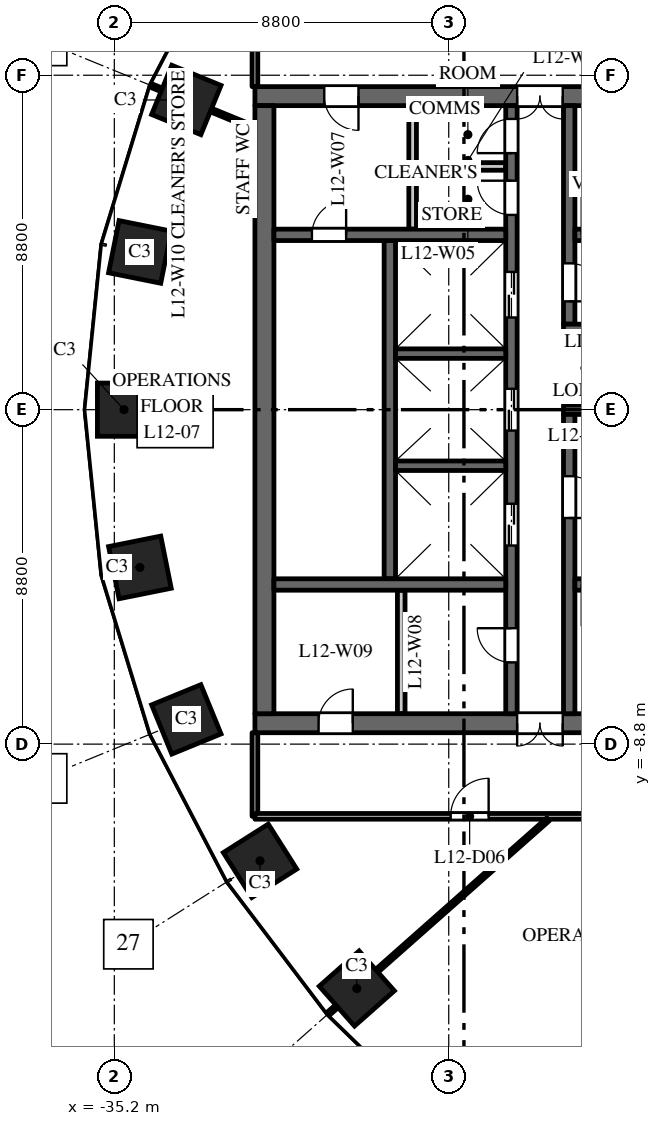
"""IFC4 building model, lengths in metres.
Left out: names, types, materials, properties, quantities, classifications, styles, units other than length and angle.
Written with IfcOpenShell. Run it as: python <this file> out.ifc"""

import sys

from ifc_helpers import new_model, si_unit, direction, frame, frame_2d, origin, origin_2d, place, context, subcontext, project, spatial, rectangle, extrude, element, fill, save


model = new_model("IFC4")
c1 = context("Model", 3, precision=1e-05, world=origin(), true_north=direction((0.0, 1.0)))
c2 = subcontext(c1, "Body", "Model", "MODEL_VIEW")
j1 = project(units=[si_unit("LENGTHUNIT", "METRE"), si_unit("PLANEANGLEUNIT", "RADIAN")], contexts=[c1])
p1 = place(None, origin())
s1 = spatial("IfcSite", under=j1, at=p1, CompositionType="ELEMENT")
p2 = place(p1, origin())
s2 = spatial("IfcBuilding", under=s1, at=p2, CompositionType="ELEMENT")
p3 = place(p2, frame((0.0, 0.0, 58.5)))
s3 = spatial("IfcBuildingStorey", under=s2, at=p3, CompositionType="ELEMENT", Elevation=58.5)
for number, where, z_axis, x_axis in (
    (1, (-33.305, 8.149, 0.0), (0.0, 0.0, 1.0), (-0.379, -0.925, 0.0)),
    (2, (-34.527, 4.151, 0.0), (0.0, 0.0, 1.0), (-0.197, -0.98, 0.0)),
    (3, (-34.945, 0.0, 0.0), (0.0, 0.0, 1.0), (0.0, -1.0, 0.0)),
    (4, (-34.527, -4.151, 0.0), (0.0, 0.0, 1.0), (0.197, -0.98, 0.0)),
    (5, (-33.305, -8.149, 0.0), (0.0, 0.0, 1.0), (0.379, -0.925, 0.0)),
    (6, (-31.365, -11.871, 0.0), (0.0, 0.0, 1.0), (0.535, -0.845, 0.0)),
    (7, (-28.819, -15.23, 0.0), (0.0, 0.0, 1.0), (0.663, -0.749, 0.0)),
):
    element("IfcColumn", number, at=place(p3, frame(where, z_axis=z_axis, x_axis=x_axis)), inside=s3, PredefinedType="COLUMN", context=c2, shape_type="SweptSolid", body=[
        extrude(rectangle(XDim=1.4, YDim=1.4, at=origin_2d()), origin(), (0.0, 0.0, 1.0), 4.0),
    ])
p4 = place(p3, frame((-16.5, 8.25, 0.0), z_axis=(0.0, 0.0, 1.0), x_axis=(-1.0, 0.0, 0.0)))
e8 = element("IfcWall", 8, at=p4, inside=s3, PredefinedType="SHEAR", context=c2, shape_type="SweptSolid", body=[
    extrude(rectangle(XDim=15.0, YDim=0.5, at=frame_2d((7.5, 0.0))), origin(), (0.0, 0.0, 1.0), 3.7),
])
p5 = place(p4, frame((6.9, 0.0, 0.0)))
e9 = element("IfcOpeningElement", 9, at=p5, cuts=e8, PredefinedType="OPENING", context=c2, shape_type="SweptSolid", body=[
    extrude(rectangle(XDim=1.2, YDim=2.1, at=frame_2d((0.6, 1.05))), frame((0.0, 0.26, 0.0), z_axis=(0.0, -1.0, 0.0), x_axis=(1.0, 0.0, 0.0)), (0.0, 0.0, 1.0), 0.52),
])
p6 = place(p4, frame((12.275, 0.0, 0.0)))
e10 = element("IfcOpeningElement", 10, at=p6, cuts=e8, PredefinedType="OPENING", context=c2, shape_type="SweptSolid", body=[
    extrude(rectangle(XDim=0.9, YDim=2.1, at=frame_2d((0.45, 1.05))), frame((0.0, 0.26, 0.0), z_axis=(0.0, -1.0, 0.0), x_axis=(1.0, 0.0, 0.0)), (0.0, 0.0, 1.0), 0.52),
])
p7 = place(p3, frame((-16.5, -8.25, 0.0), z_axis=(0.0, 0.0, 1.0), x_axis=(-1.0, 0.0, 0.0)))
e11 = element("IfcWall", 11, at=p7, inside=s3, PredefinedType="SHEAR", context=c2, shape_type="SweptSolid", body=[
    extrude(rectangle(XDim=15.0, YDim=0.5, at=frame_2d((7.5, 0.0))), origin(), (0.0, 0.0, 1.0), 3.7),
])
p8 = place(p7, frame((6.9, 0.0, 0.0)))
e12 = element("IfcOpeningElement", 12, at=p8, cuts=e11, PredefinedType="OPENING", context=c2, shape_type="SweptSolid", body=[
    extrude(rectangle(XDim=1.2, YDim=2.1, at=frame_2d((0.6, 1.05))), frame((0.0, 0.26, 0.0), z_axis=(0.0, -1.0, 0.0), x_axis=(1.0, 0.0, 0.0)), (0.0, 0.0, 1.0), 0.52),
])
p9 = place(p7, frame((12.425, 0.0, 0.0)))
e13 = element("IfcOpeningElement", 13, at=p9, cuts=e11, PredefinedType="OPENING", context=c2, shape_type="SweptSolid", body=[
    extrude(rectangle(XDim=0.9, YDim=2.1, at=frame_2d((0.45, 1.05))), frame((0.0, 0.26, 0.0), z_axis=(0.0, -1.0, 0.0), x_axis=(1.0, 0.0, 0.0)), (0.0, 0.0, 1.0), 0.52),
])
p10 = place(p3, frame((-27.95, -4.45, 0.0), z_axis=(0.0, 0.0, 1.0), x_axis=(0.0, 1.0, 0.0)))
e14 = element("IfcWall", 14, at=p10, inside=s3, PredefinedType="SHEAR", context=c2, shape_type="SweptSolid", body=[
    extrude(rectangle(XDim=8.9, YDim=0.3, at=frame_2d((4.45, 0.0))), origin(), (0.0, 0.0, 1.0), 3.7),
])
p11 = place(p3, frame((-24.75, -8.0, 0.0), z_axis=(0.0, 0.0, 1.0), x_axis=(0.0, 1.0, 0.0)))
e15 = element("IfcWall", 15, at=p11, inside=s3, PredefinedType="SHEAR", context=c2, shape_type="SweptSolid", body=[
    extrude(rectangle(XDim=16.0, YDim=0.3, at=frame_2d((8.0, 0.0))), origin(), (0.0, 0.0, 1.0), 3.7),
])
p12 = place(p11, frame((4.425, 0.0, 0.0)))
e16 = element("IfcOpeningElement", 16, at=p12, cuts=e15, PredefinedType="OPENING", context=c2, shape_type="SweptSolid", body=[
    extrude(rectangle(XDim=1.1, YDim=2.1, at=frame_2d((0.55, 1.05))), frame((0.0, 0.16, 0.0), z_axis=(0.0, -1.0, 0.0), x_axis=(1.0, 0.0, 0.0)), (0.0, 0.0, 1.0), 0.32),
])
p13 = place(p11, frame((7.45, 0.0, 0.0)))
e17 = element("IfcOpeningElement", 17, at=p13, cuts=e15, PredefinedType="OPENING", context=c2, shape_type="SweptSolid", body=[
    extrude(rectangle(XDim=1.1, YDim=2.1, at=frame_2d((0.55, 1.05))), frame((0.0, 0.16, 0.0), z_axis=(0.0, -1.0, 0.0), x_axis=(1.0, 0.0, 0.0)), (0.0, 0.0, 1.0), 0.32),
])
p14 = place(p11, frame((10.425, 0.0, 0.0)))
e18 = element("IfcOpeningElement", 18, at=p14, cuts=e15, PredefinedType="OPENING", context=c2, shape_type="SweptSolid", body=[
    extrude(rectangle(XDim=1.2, YDim=2.1, at=frame_2d((0.6, 1.05))), frame((0.0, 0.16, 0.0), z_axis=(0.0, -1.0, 0.0), x_axis=(1.0, 0.0, 0.0)), (0.0, 0.0, 1.0), 0.32),
])
p15 = place(p11, frame((13.125, 0.0, 0.0)))
e19 = element("IfcOpeningElement", 19, at=p15, cuts=e15, PredefinedType="OPENING", context=c2, shape_type="SweptSolid", body=[
    extrude(rectangle(XDim=0.9, YDim=2.1, at=frame_2d((0.45, 1.05))), frame((0.0, 0.16, 0.0), z_axis=(0.0, -1.0, 0.0), x_axis=(1.0, 0.0, 0.0)), (0.0, 0.0, 1.0), 0.32),
])
p16 = place(p11, frame((14.75, 0.0, 0.0)))
e20 = element("IfcOpeningElement", 20, at=p16, cuts=e15, PredefinedType="OPENING", context=c2, shape_type="SweptSolid", body=[
    extrude(rectangle(XDim=0.9, YDim=2.1, at=frame_2d((0.45, 1.05))), frame((0.0, 0.16, 0.0), z_axis=(0.0, -1.0, 0.0), x_axis=(1.0, 0.0, 0.0)), (0.0, 0.0, 1.0), 0.32),
])
p17 = place(p11, frame((1.35, 0.0, 0.0)))
e21 = element("IfcOpeningElement", 21, at=p17, cuts=e15, PredefinedType="OPENING", context=c2, shape_type="SweptSolid", body=[
    extrude(rectangle(XDim=0.9, YDim=2.1, at=frame_2d((0.45, 1.05))), frame((0.0, 0.16, 0.0), z_axis=(0.0, -1.0, 0.0), x_axis=(1.0, 0.0, 0.0)), (0.0, 0.0, 1.0), 0.32),
])
p18 = place(p3, frame((-20.1, 0.0, 0.0), z_axis=(0.0, 0.0, 1.0), x_axis=(-1.0, 0.0, 0.0)))
e22 = element("IfcWall", 22, at=p18, inside=s3, PredefinedType="SHEAR", context=c2, shape_type="SweptSolid", body=[
    extrude(rectangle(XDim=3.28, YDim=0.25, at=frame_2d((1.64, 0.0))), origin(), (0.0, 0.0, 1.0), 3.7),
])
p19 = place(p3, frame((-31.25, -8.0, 0.0), z_axis=(0.0, 0.0, 1.0), x_axis=(0.0, 1.0, 0.0)))
e23 = element("IfcWall", 23, at=p19, inside=s3, PredefinedType="SHEAR", context=c2, shape_type="SweptSolid", body=[
    extrude(rectangle(XDim=16.0, YDim=0.5, at=frame_2d((8.0, 0.0))), origin(), (0.0, 0.0, 1.0), 3.7),
])
p20 = place(p3, frame((-24.9, 4.6, 0.0), z_axis=(0.0, 0.0, 1.0), x_axis=(-1.0, 0.0, 0.0)))
e24 = element("IfcWall", 24, at=p20, inside=s3, PredefinedType="SHEAR", context=c2, shape_type="SweptSolid", body=[
    extrude(rectangle(XDim=6.1, YDim=0.3, at=frame_2d((3.05, 0.0))), origin(), (0.0, 0.0, 1.0), 3.7),
])
p21 = place(p20, frame((4.2, 0.0, 0.0)))
e25 = element("IfcOpeningElement", 25, at=p21, cuts=e24, PredefinedType="OPENING", context=c2, shape_type="SweptSolid", body=[
    extrude(rectangle(XDim=0.9, YDim=2.1, at=frame_2d((0.45, 1.05))), frame((0.0, 0.16, 0.0), z_axis=(0.0, -1.0, 0.0), x_axis=(1.0, 0.0, 0.0)), (0.0, 0.0, 1.0), 0.32),
])
for number, where, z_axis, x_axis in (
    (26, (-27.35, 4.75, 0.0), (0.0, 0.0, 1.0), (0.0, 1.0, 0.0)),
    (27, (-27.65, -8.0, 0.0), (0.0, 0.0, 1.0), (0.0, 1.0, 0.0)),
):
    element("IfcWall", number, at=place(p3, frame(where, z_axis=z_axis, x_axis=x_axis)), inside=s3, PredefinedType="PARTITIONING", context=c2, shape_type="SweptSolid", body=[
        extrude(rectangle(XDim=3.25, YDim=0.2, at=frame_2d((1.625, 0.0))), origin(), (0.0, 0.0, 1.0), 3.7),
    ])
p22 = place(p3, frame((-24.9, 6.4, 0.0), z_axis=(0.0, 0.0, 1.0), x_axis=(-1.0, 0.0, 0.0)))
e28 = element("IfcWall", 28, at=p22, inside=s3, PredefinedType="PARTITIONING", context=c2, shape_type="SweptSolid", body=[
    extrude(rectangle(XDim=2.35, YDim=0.2, at=frame_2d((1.175, 0.0))), origin(), (0.0, 0.0, 1.0), 3.7),
])
p23 = place(p3, frame((-24.9, -4.6, 0.0), z_axis=(0.0, 0.0, 1.0), x_axis=(-1.0, 0.0, 0.0)))
e29 = element("IfcWall", 29, at=p23, inside=s3, PredefinedType="SHEAR", context=c2, shape_type="SweptSolid", body=[
    extrude(rectangle(XDim=6.1, YDim=0.3, at=frame_2d((3.05, 0.0))), origin(), (0.0, 0.0, 1.0), 3.7),
])
for number, where, z_axis, x_axis in (
    (30, (-24.9, -1.475, 0.0), (0.0, 0.0, 1.0), (-1.0, 0.0, 0.0)),
    (31, (-24.9, 1.475, 0.0), (0.0, 0.0, 1.0), (-1.0, 0.0, 0.0)),
):
    element("IfcWall", number, at=place(p3, frame(where, z_axis=z_axis, x_axis=x_axis)), inside=s3, PredefinedType="SHEAR", context=c2, shape_type="SweptSolid", body=[
        extrude(rectangle(XDim=2.9, YDim=0.25, at=frame_2d((1.45, 0.0))), origin(), (0.0, 0.0, 1.0), 3.7),
    ])
p24 = place(p3, frame((-23.23, 2.25, 0.0), z_axis=(0.0, 0.0, 1.0), x_axis=(0.0, 1.0, 0.0)))
e32 = element("IfcWall", 32, at=p24, inside=s3, PredefinedType="SHEAR", context=c2, shape_type="SweptSolid", body=[
    extrude(rectangle(XDim=5.75, YDim=0.3, at=frame_2d((2.875, 0.0))), origin(), (0.0, 0.0, 1.0), 3.7),
])
p25 = place(p24, frame((0.6, 0.0, 0.0)))
e33 = element("IfcOpeningElement", 33, at=p25, cuts=e32, PredefinedType="OPENING", context=c2, shape_type="SweptSolid", body=[
    extrude(rectangle(XDim=1.0, YDim=2.1, at=frame_2d((0.5, 1.05))), frame((0.0, 0.16, 0.0), z_axis=(0.0, -1.0, 0.0), x_axis=(1.0, 0.0, 0.0)), (0.0, 0.0, 1.0), 0.32),
])
p26 = place(p3, frame((-23.23, -8.0, 0.0), z_axis=(0.0, 0.0, 1.0), x_axis=(0.0, 1.0, 0.0)))
e34 = element("IfcWall", 34, at=p26, inside=s3, PredefinedType="SHEAR", context=c2, shape_type="SweptSolid", body=[
    extrude(rectangle(XDim=7.875, YDim=0.3, at=frame_2d((3.938, 0.0))), origin(), (0.0, 0.0, 1.0), 3.7),
])
p27 = place(p26, frame((5.15, 0.0, 0.0)))
e35 = element("IfcOpeningElement", 35, at=p27, cuts=e34, PredefinedType="OPENING", context=c2, shape_type="SweptSolid", body=[
    extrude(rectangle(XDim=1.1, YDim=2.1, at=frame_2d((0.55, 1.05))), frame((0.0, 0.16, 0.0), z_axis=(0.0, -1.0, 0.0), x_axis=(1.0, 0.0, 0.0)), (0.0, 0.0, 1.0), 0.32),
])
p28 = place(p3, frame((-16.9, 4.6, 0.0), z_axis=(0.0, 0.0, 1.0), x_axis=(-1.0, 0.0, 0.0)))
e36 = element("IfcWall", 36, at=p28, inside=s3, PredefinedType="SHEAR", context=c2, shape_type="SweptSolid", body=[
    extrude(rectangle(XDim=6.18, YDim=0.3, at=frame_2d((3.09, 0.0))), origin(), (0.0, 0.0, 1.0), 3.7),
])
p29 = place(p28, frame((4.9, 0.0, 0.0)))
e37 = element("IfcOpeningElement", 37, at=p29, cuts=e36, PredefinedType="OPENING", context=c2, shape_type="SweptSolid", body=[
    extrude(rectangle(XDim=1.1, YDim=2.1, at=frame_2d((0.55, 1.05))), frame((0.0, 0.16, 0.0), z_axis=(0.0, -1.0, 0.0), x_axis=(1.0, 0.0, 0.0)), (0.0, 0.0, 1.0), 0.32),
])
p30 = place(p3, frame((-16.9, -4.6, 0.0), z_axis=(0.0, 0.0, 1.0), x_axis=(-1.0, 0.0, 0.0)))
e38 = element("IfcWall", 38, at=p30, inside=s3, PredefinedType="SHEAR", context=c2, shape_type="SweptSolid", body=[
    extrude(rectangle(XDim=6.18, YDim=0.3, at=frame_2d((3.09, 0.0))), origin(), (0.0, 0.0, 1.0), 3.7),
])
p31 = place(p30, frame((4.9, 0.0, 0.0)))
e39 = element("IfcOpeningElement", 39, at=p31, cuts=e38, PredefinedType="OPENING", context=c2, shape_type="SweptSolid", body=[
    extrude(rectangle(XDim=1.1, YDim=2.1, at=frame_2d((0.55, 1.05))), frame((0.0, 0.16, 0.0), z_axis=(0.0, -1.0, 0.0), x_axis=(1.0, 0.0, 0.0)), (0.0, 0.0, 1.0), 0.32),
])
p32 = place(p3, frame((-20.85, 2.125, 0.0), z_axis=(0.0, 0.0, 1.0), x_axis=(-1.0, 0.0, 0.0)))
e40 = element("IfcWall", 40, at=p32, inside=s3, PredefinedType="SHEAR", context=c2, shape_type="SweptSolid", body=[
    extrude(rectangle(XDim=2.53, YDim=0.25, at=frame_2d((1.265, 0.0))), origin(), (0.0, 0.0, 1.0), 3.7),
])
p33 = place(p3, frame((-34.234, 8.53, 0.0), z_axis=(0.0, 0.0, 1.0), x_axis=(0.925344112436, -0.379128307542, 0.0)))
e41 = element("IfcWall", 41, at=p33, inside=s3, PredefinedType="PARTITIONING", context=c2, shape_type="SweptSolid", body=[
    extrude(rectangle(XDim=2.954, YDim=0.1, at=frame_2d((1.477, 0.0))), origin(), (0.0, 0.0, 1.0), 2.85),
])
p34 = place(p3, frame((-31.5, -10.7, 0.0), z_axis=(0.0, 0.0, 1.0), x_axis=(0.0, 1.0, 0.0)))
e42 = element("IfcWall", 42, at=p34, inside=s3, PredefinedType="PARTITIONING", context=c2, shape_type="SweptSolid", body=[
    extrude(rectangle(XDim=2.2, YDim=0.15, at=frame_2d((1.1, 0.0))), origin(), (0.0, 0.0, 1.0), 3.7),
])
p35 = place(p3, frame((-31.5, -10.7, 0.0), z_axis=(0.0, 0.0, 1.0), x_axis=(1.0, 0.0, 0.0)))
e43 = element("IfcWall", 43, at=p35, inside=s3, PredefinedType="PARTITIONING", context=c2, shape_type="SweptSolid", body=[
    extrude(rectangle(XDim=15.0, YDim=0.15, at=frame_2d((7.5, 0.0))), origin(), (0.0, 0.0, 1.0), 3.1),
])
p36 = place(p35, frame((5.15, 0.0, 0.0)))
e44 = element("IfcOpeningElement", 44, at=p36, cuts=e43, PredefinedType="OPENING", context=c2, shape_type="SweptSolid", body=[
    extrude(rectangle(XDim=1.0, YDim=2.1, at=frame_2d((0.5, 1.05))), frame((0.0, 0.085, 0.0), z_axis=(0.0, -1.0, 0.0), x_axis=(1.0, 0.0, 0.0)), (0.0, 0.0, 1.0), 0.17),
])
p37 = place(p35, frame((13.448, 0.0, 0.0)))
e45 = element("IfcOpeningElement", 45, at=p37, cuts=e43, PredefinedType="OPENING", context=c2, shape_type="SweptSolid", body=[
    extrude(rectangle(XDim=1.0, YDim=2.1, at=frame_2d((0.5, 1.05))), frame((0.0, 0.085, 0.0), z_axis=(0.0, -1.0, 0.0), x_axis=(1.0, 0.0, 0.0)), (0.0, 0.0, 1.0), 0.17),
])
p38 = place(p3, frame((-31.5, 8.5, 0.0), z_axis=(0.0, 0.0, 1.0), x_axis=(0.0, 1.0, 0.0)))
e46 = element("IfcWall", 46, at=p38, inside=s3, PredefinedType="PARTITIONING", context=c2, shape_type="SweptSolid", body=[
    extrude(rectangle(XDim=2.2, YDim=0.15, at=frame_2d((1.1, 0.0))), origin(), (0.0, 0.0, 1.0), 3.7),
])
p39 = place(p3, frame((-29.569, -15.895, 0.0), z_axis=(0.0, 0.0, 1.0), x_axis=(0.748985701008, 0.662586160198, 0.0)))
e47 = element("IfcWall", 47, at=p39, inside=s3, PredefinedType="PARTITIONING", context=c2, shape_type="SweptSolid", body=[
    extrude(rectangle(XDim=7.723, YDim=0.1, at=frame_2d((3.861, 0.0))), origin(), (0.0, 0.0, 1.0), 2.85),
])
p40 = place(p12, origin())
e48 = element("IfcDoor", 48, at=p40, inside=s3, OperationType="DOUBLE_DOOR_SLIDING", PredefinedType="DOOR", context=c2, shape_type="SweptSolid", body=[
    extrude(rectangle(XDim=1.1, YDim=2.1, at=frame_2d((0.55, 1.05))), frame((0.0, 0.025, 0.0), z_axis=(0.0, -1.0, 0.0), x_axis=(1.0, 0.0, 0.0)), (0.0, 0.0, 1.0), 0.05),
])
fill(e16, e48)
p41 = place(p13, origin())
e49 = element("IfcDoor", 49, at=p41, inside=s3, OperationType="DOUBLE_DOOR_SLIDING", PredefinedType="DOOR", context=c2, shape_type="SweptSolid", body=[
    extrude(rectangle(XDim=1.1, YDim=2.1, at=frame_2d((0.55, 1.05))), frame((0.0, 0.025, 0.0), z_axis=(0.0, -1.0, 0.0), x_axis=(1.0, 0.0, 0.0)), (0.0, 0.0, 1.0), 0.05),
])
fill(e17, e49)
p42 = place(p14, origin())
e50 = element("IfcDoor", 50, at=p42, inside=s3, OperationType="DOUBLE_DOOR_SLIDING", PredefinedType="DOOR", context=c2, shape_type="SweptSolid", body=[
    extrude(rectangle(XDim=1.2, YDim=2.1, at=frame_2d((0.6, 1.05))), frame((0.0, 0.025, 0.0), z_axis=(0.0, -1.0, 0.0), x_axis=(1.0, 0.0, 0.0)), (0.0, 0.0, 1.0), 0.05),
])
fill(e18, e50)
p43 = place(p29, origin())
e51 = element("IfcDoor", 51, at=p43, inside=s3, OperationType="SINGLE_SWING_RIGHT", PredefinedType="DOOR", context=c2, shape_type="SweptSolid", body=[
    extrude(rectangle(XDim=1.1, YDim=2.1, at=frame_2d((0.55, 1.05))), frame((0.0, 0.025, 0.0), z_axis=(0.0, -1.0, 0.0), x_axis=(1.0, 0.0, 0.0)), (0.0, 0.0, 1.0), 0.05),
])
fill(e37, e51)
p44 = place(p31, origin())
e52 = element("IfcDoor", 52, at=p44, inside=s3, OperationType="SINGLE_SWING_LEFT", PredefinedType="DOOR", context=c2, shape_type="SweptSolid", body=[
    extrude(rectangle(XDim=1.1, YDim=2.1, at=frame_2d((0.55, 1.05))), frame((0.0, 0.025, 0.0), z_axis=(0.0, -1.0, 0.0), x_axis=(1.0, 0.0, 0.0)), (0.0, 0.0, 1.0), 0.05),
])
fill(e39, e52)
p45 = place(p27, origin())
e53 = element("IfcDoor", 53, at=p45, inside=s3, OperationType="SINGLE_SWING_LEFT", PredefinedType="DOOR", context=c2, shape_type="SweptSolid", body=[
    extrude(rectangle(XDim=1.1, YDim=2.1, at=frame_2d((0.55, 1.05))), frame((0.0, 0.025, 0.0), z_axis=(0.0, -1.0, 0.0), x_axis=(1.0, 0.0, 0.0)), (0.0, 0.0, 1.0), 0.05),
])
fill(e35, e53)
p46 = place(p25, origin())
e54 = element("IfcDoor", 54, at=p46, inside=s3, OperationType="SINGLE_SWING_LEFT", PredefinedType="DOOR", context=c2, shape_type="SweptSolid", body=[
    extrude(rectangle(XDim=1.0, YDim=2.1, at=frame_2d((0.5, 1.05))), frame((0.0, 0.025, 0.0), z_axis=(0.0, -1.0, 0.0), x_axis=(1.0, 0.0, 0.0)), (0.0, 0.0, 1.0), 0.05),
])
fill(e33, e54)
p47 = place(p5, origin())
e55 = element("IfcDoor", 55, at=p47, inside=s3, OperationType="DOUBLE_DOOR_DOUBLE_SWING", PredefinedType="DOOR", context=c2, shape_type="SweptSolid", body=[
    extrude(rectangle(XDim=1.2, YDim=2.1, at=frame_2d((0.6, 1.05))), frame((0.0, 0.025, 0.0), z_axis=(0.0, -1.0, 0.0), x_axis=(1.0, 0.0, 0.0)), (0.0, 0.0, 1.0), 0.05),
])
fill(e9, e55)
p48 = place(p8, origin())
e56 = element("IfcDoor", 56, at=p48, inside=s3, OperationType="DOUBLE_DOOR_DOUBLE_SWING", PredefinedType="DOOR", context=c2, shape_type="SweptSolid", body=[
    extrude(rectangle(XDim=1.2, YDim=2.1, at=frame_2d((0.6, 1.05))), frame((0.0, 0.025, 0.0), z_axis=(0.0, -1.0, 0.0), x_axis=(1.0, 0.0, 0.0)), (0.0, 0.0, 1.0), 0.05),
])
fill(e12, e56)
p49 = place(p15, origin())
e57 = element("IfcDoor", 57, at=p49, inside=s3, OperationType="SINGLE_SWING_LEFT", PredefinedType="DOOR", context=c2, shape_type="SweptSolid", body=[
    extrude(rectangle(XDim=0.9, YDim=2.1, at=frame_2d((0.45, 1.05))), frame((0.0, 0.025, 0.0), z_axis=(0.0, -1.0, 0.0), x_axis=(1.0, 0.0, 0.0)), (0.0, 0.0, 1.0), 0.05),
])
fill(e19, e57)
p50 = place(p16, origin())
e58 = element("IfcDoor", 58, at=p50, inside=s3, OperationType="SINGLE_SWING_RIGHT", PredefinedType="DOOR", context=c2, shape_type="SweptSolid", body=[
    extrude(rectangle(XDim=0.9, YDim=2.1, at=frame_2d((0.45, 1.05))), frame((0.0, 0.025, 0.0), z_axis=(0.0, -1.0, 0.0), x_axis=(1.0, 0.0, 0.0)), (0.0, 0.0, 1.0), 0.05),
])
fill(e20, e58)
p51 = place(p6, origin())
e59 = element("IfcDoor", 59, at=p51, inside=s3, OperationType="SINGLE_SWING_RIGHT", PredefinedType="DOOR", context=c2, shape_type="SweptSolid", body=[
    extrude(rectangle(XDim=0.9, YDim=2.1, at=frame_2d((0.45, 1.05))), frame((0.0, 0.025, 0.0), z_axis=(0.0, -1.0, 0.0), x_axis=(1.0, 0.0, 0.0)), (0.0, 0.0, 1.0), 0.05),
])
fill(e10, e59)
p52 = place(p17, origin())
e60 = element("IfcDoor", 60, at=p52, inside=s3, OperationType="SINGLE_SWING_LEFT", PredefinedType="DOOR", context=c2, shape_type="SweptSolid", body=[
    extrude(rectangle(XDim=0.9, YDim=2.1, at=frame_2d((0.45, 1.05))), frame((0.0, 0.025, 0.0), z_axis=(0.0, -1.0, 0.0), x_axis=(1.0, 0.0, 0.0)), (0.0, 0.0, 1.0), 0.05),
])
fill(e21, e60)
p53 = place(p9, origin())
e61 = element("IfcDoor", 61, at=p53, inside=s3, OperationType="SINGLE_SWING_LEFT", PredefinedType="DOOR", context=c2, shape_type="SweptSolid", body=[
    extrude(rectangle(XDim=0.9, YDim=2.1, at=frame_2d((0.45, 1.05))), frame((0.0, 0.025, 0.0), z_axis=(0.0, -1.0, 0.0), x_axis=(1.0, 0.0, 0.0)), (0.0, 0.0, 1.0), 0.05),
])
fill(e13, e61)
p54 = place(p21, origin())
e62 = element("IfcDoor", 62, at=p54, inside=s3, OperationType="SINGLE_SWING_LEFT", PredefinedType="DOOR", context=c2, shape_type="SweptSolid", body=[
    extrude(rectangle(XDim=0.9, YDim=2.1, at=frame_2d((0.45, 1.05))), frame((0.0, 0.025, 0.0), z_axis=(0.0, -1.0, 0.0), x_axis=(1.0, 0.0, 0.0)), (0.0, 0.0, 1.0), 0.05),
])
fill(e25, e62)
p55 = place(p36, origin())
e63 = element("IfcDoor", 63, at=p55, inside=s3, OperationType="SINGLE_SWING_RIGHT", PredefinedType="DOOR", context=c2, shape_type="SweptSolid", body=[
    extrude(rectangle(XDim=1.0, YDim=2.1, at=frame_2d((0.5, 1.05))), frame((0.0, 0.025, 0.0), z_axis=(0.0, -1.0, 0.0), x_axis=(1.0, 0.0, 0.0)), (0.0, 0.0, 1.0), 0.05),
])
fill(e44, e63)
save(model, sys.argv[1])
